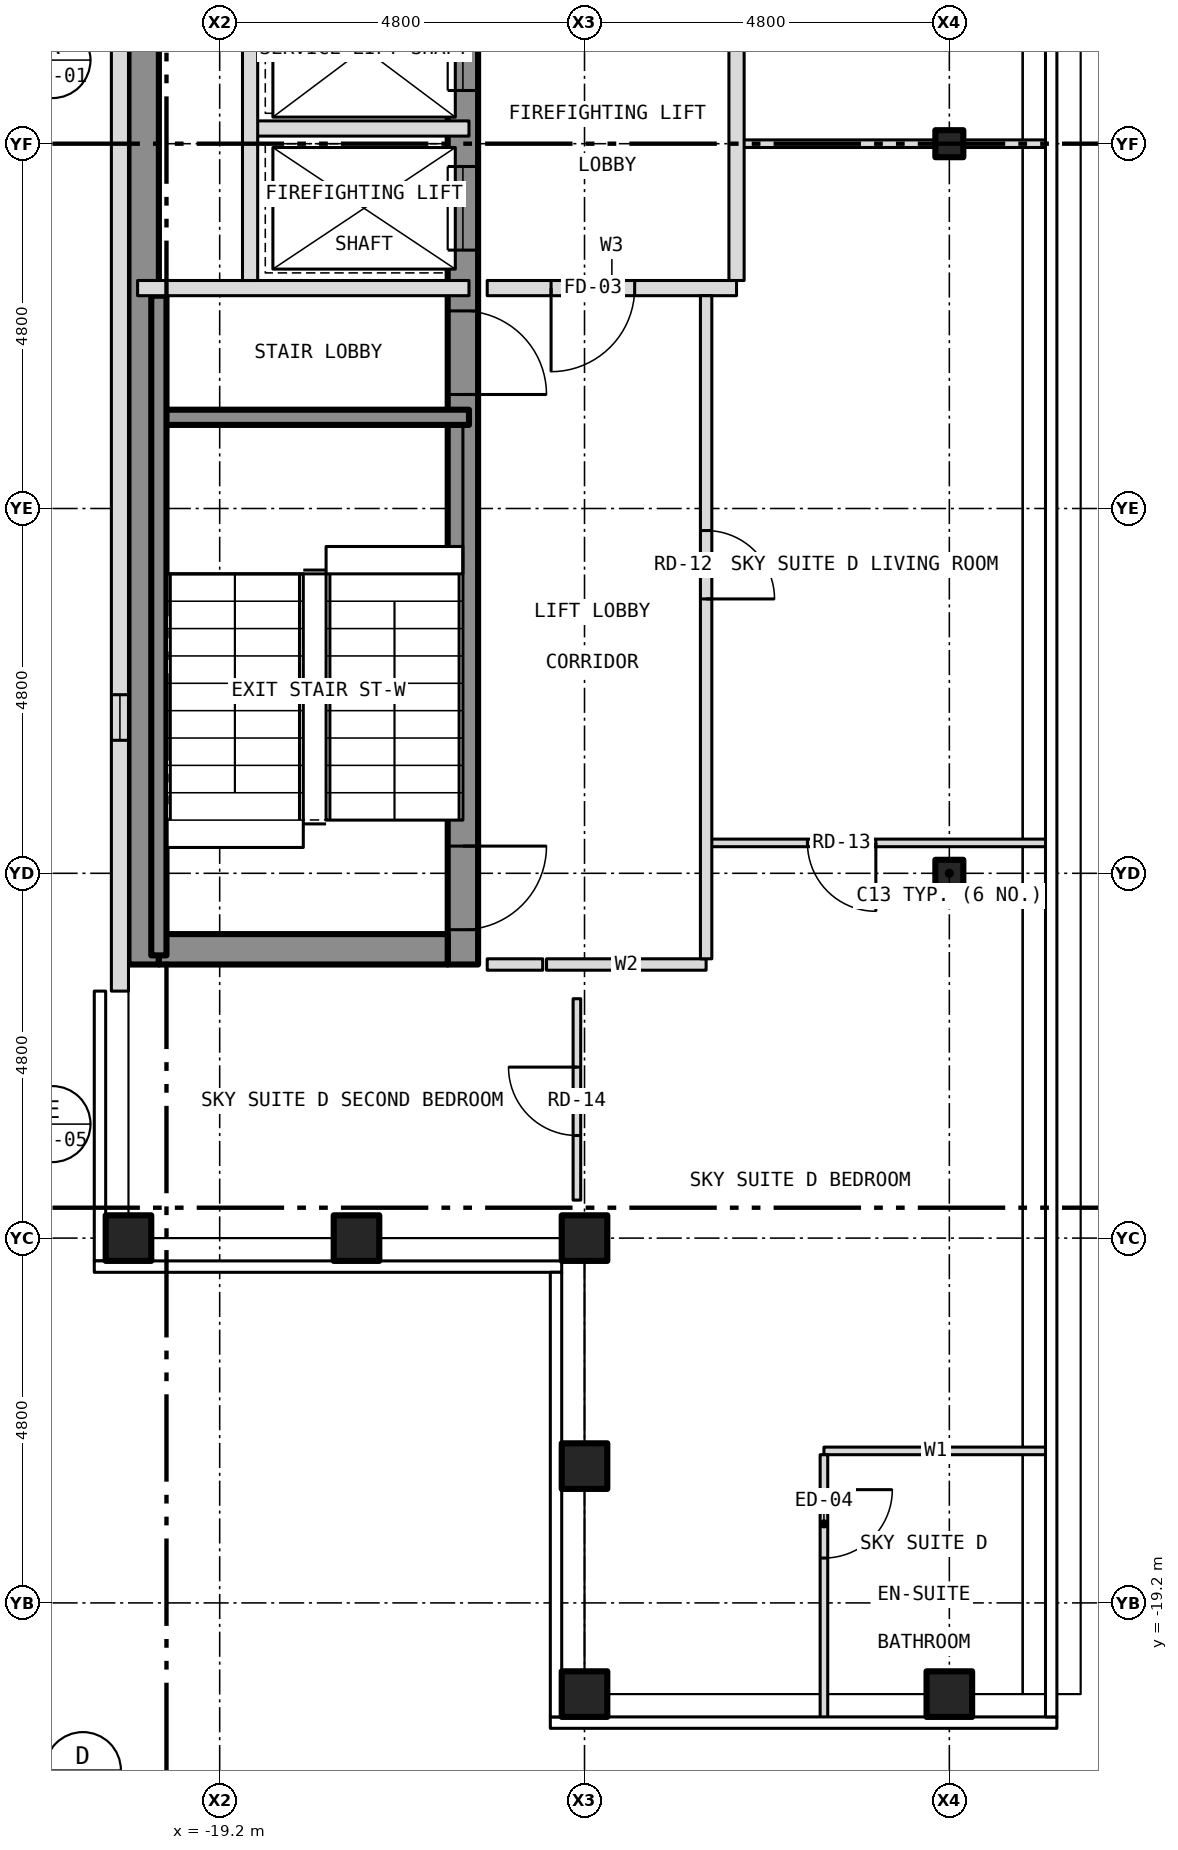
"""IFC4 building model, lengths in metres.
Left out: names, types, materials, properties, quantities, classifications, styles, units other than length and angle.
Written with IfcOpenShell. Run it as: python <this file> out.ifc"""

import sys

from ifc_helpers import new_model, si_unit, direction, frame, frame_2d, origin, origin_2d, place, context, subcontext, project, spatial, rectangle, hollow_rectangle, i_section, extrude, element, fill, save


model = new_model("IFC4")
c1 = context("Model", 3, precision=1e-05, world=origin(), true_north=direction((0.0, 1.0)))
c2 = subcontext(c1, "Body", "Model", "MODEL_VIEW")
j1 = project(units=[si_unit("LENGTHUNIT", "METRE"), si_unit("PLANEANGLEUNIT", "RADIAN")], contexts=[c1])
p1 = place(None, origin())
s1 = spatial("IfcSite", under=j1, at=p1, CompositionType="ELEMENT")
p2 = place(p1, origin())
s2 = spatial("IfcBuilding", under=s1, at=p2, CompositionType="ELEMENT")
p3 = place(p2, frame((0.0, 0.0, 272.5)))
s3 = spatial("IfcBuildingStorey", under=s2, at=p3, CompositionType="ELEMENT", Elevation=272.5)
for number, where, z_axis, x_axis in (
    (1, (-14.4, -20.4, -0.15), (0.0, 0.0, 1.0), (1.0, 0.0, 0.0)),
    (2, (-9.6, -20.4, -0.15), (0.0, 0.0, 1.0), (1.0, 0.0, 0.0)),
    (3, (-20.4, -14.4, -0.15), (0.0, 0.0, 1.0), (1.0, 0.0, 0.0)),
    (4, (-14.4, -14.4, -0.15), (0.0, 0.0, 1.0), (1.0, 0.0, 0.0)),
    (5, (-14.4, -17.4, -0.15), (0.0, 0.0, 1.0), (1.0, 0.0, 0.0)),
    (6, (-17.4, -14.4, -0.15), (0.0, 0.0, 1.0), (1.0, 0.0, 0.0)),
):
    element("IfcColumn", number, at=place(p3, frame(where, z_axis=z_axis, x_axis=x_axis)), inside=s3, PredefinedType="COLUMN", context=c2, shape_type="SweptSolid", body=[
        extrude(hollow_rectangle(XDim=0.6, YDim=0.6, WallThickness=0.03, at=origin_2d()), origin(), (0.0, 0.0, 1.0), 3.5),
    ])
for number, where, z_axis, x_axis in (
    (7, (-9.6, -9.6, -0.15), (0.0, 0.0, 1.0), (1.0, 0.0, 0.0)),
    (8, (-9.6, 0.0, -0.15), (0.0, 0.0, 1.0), (1.0, 0.0, 0.0)),
):
    element("IfcColumn", number, at=place(p3, frame(where, z_axis=z_axis, x_axis=x_axis)), inside=s3, PredefinedType="COLUMN", context=c2, shape_type="SweptSolid", body=[
        extrude(i_section(OverallWidth=0.368, OverallDepth=0.356, WebThickness=0.011, FlangeThickness=0.018, at=origin_2d()), origin(), (0.0, 0.0, 1.0), 3.5),
    ])
p4 = place(p3, frame((-16.0, -10.8, 0.0), z_axis=(0.0, 0.0, 1.0), x_axis=(0.0, 1.0, 0.0)))
e9 = element("IfcWall", 9, at=p4, inside=s3, PredefinedType="SHEAR", context=c2, shape_type="SweptSolid", body=[
    extrude(rectangle(XDim=21.6, YDim=0.4, at=frame_2d((10.8, 0.0))), origin(), (0.0, 0.0, 1.0), 3.25),
])
p5 = place(p4, frame((9.4, 0.0, 0.0)))
e10 = element("IfcOpeningElement", 10, at=p5, cuts=e9, PredefinedType="OPENING", context=c2, shape_type="SweptSolid", body=[
    extrude(rectangle(XDim=1.1, YDim=2.1, at=frame_2d((0.55, 1.05))), frame((0.0, 0.212, 0.0), z_axis=(0.0, -1.0, 0.0), x_axis=(1.0, 0.0, 0.0)), (0.0, 0.0, 1.0), 0.424),
])
p6 = place(p4, frame((11.5, 0.0, 0.0)))
e11 = element("IfcOpeningElement", 11, at=p6, cuts=e9, PredefinedType="OPENING", context=c2, shape_type="SweptSolid", body=[
    extrude(rectangle(XDim=1.1, YDim=2.1, at=frame_2d((0.55, 1.05))), frame((0.0, 0.212, 0.0), z_axis=(0.0, -1.0, 0.0), x_axis=(1.0, 0.0, 0.0)), (0.0, 0.0, 1.0), 0.424),
])
p7 = place(p4, frame((13.6, 0.0, 0.0)))
e12 = element("IfcOpeningElement", 12, at=p7, cuts=e9, PredefinedType="OPENING", context=c2, shape_type="SweptSolid", body=[
    extrude(rectangle(XDim=1.1, YDim=2.1, at=frame_2d((0.55, 1.05))), frame((0.0, 0.212, 0.0), z_axis=(0.0, -1.0, 0.0), x_axis=(1.0, 0.0, 0.0)), (0.0, 0.0, 1.0), 0.424),
])
p8 = place(p4, frame((15.7, 0.0, 0.0)))
e13 = element("IfcOpeningElement", 13, at=p8, cuts=e9, PredefinedType="OPENING", context=c2, shape_type="SweptSolid", body=[
    extrude(rectangle(XDim=1.1, YDim=2.1, at=frame_2d((0.55, 1.05))), frame((0.0, 0.212, 0.0), z_axis=(0.0, -1.0, 0.0), x_axis=(1.0, 0.0, 0.0)), (0.0, 0.0, 1.0), 0.424),
])
p9 = place(p4, frame((17.8, 0.0, 0.0)))
e14 = element("IfcOpeningElement", 14, at=p9, cuts=e9, PredefinedType="OPENING", context=c2, shape_type="SweptSolid", body=[
    extrude(rectangle(XDim=1.1, YDim=2.1, at=frame_2d((0.55, 1.05))), frame((0.0, 0.212, 0.0), z_axis=(0.0, -1.0, 0.0), x_axis=(1.0, 0.0, 0.0)), (0.0, 0.0, 1.0), 0.424),
])
p10 = place(p4, frame((0.458, 0.0, 0.0)))
e15 = element("IfcOpeningElement", 15, at=p10, cuts=e9, PredefinedType="OPENING", context=c2, shape_type="SweptSolid", body=[
    extrude(rectangle(XDim=1.1, YDim=2.1, at=frame_2d((0.55, 1.05))), frame((0.0, 0.212, 0.0), z_axis=(0.0, -1.0, 0.0), x_axis=(1.0, 0.0, 0.0)), (0.0, 0.0, 1.0), 0.424),
])
p11 = place(p4, frame((7.5, 0.0, 0.0)))
e16 = element("IfcOpeningElement", 16, at=p11, cuts=e9, PredefinedType="OPENING", context=c2, shape_type="SweptSolid", body=[
    extrude(rectangle(XDim=1.1, YDim=2.1, at=frame_2d((0.55, 1.05))), frame((0.0, 0.212, 0.0), z_axis=(0.0, -1.0, 0.0), x_axis=(1.0, 0.0, 0.0)), (0.0, 0.0, 1.0), 0.424),
])
p12 = place(p4, frame((20.0, 0.0, 0.0)))
e17 = element("IfcOpeningElement", 17, at=p12, cuts=e9, PredefinedType="OPENING", context=c2, shape_type="SweptSolid", body=[
    extrude(rectangle(XDim=0.9, YDim=2.1, at=frame_2d((0.45, 1.05))), frame((0.0, 0.212, 0.0), z_axis=(0.0, -1.0, 0.0), x_axis=(1.0, 0.0, 0.0)), (0.0, 0.0, 1.0), 0.424),
])
p13 = place(p3, frame((-20.2, -10.8, 0.0), z_axis=(0.0, 0.0, 1.0), x_axis=(0.0, 1.0, 0.0)))
e18 = element("IfcWall", 18, at=p13, inside=s3, PredefinedType="SHEAR", context=c2, shape_type="SweptSolid", body=[
    extrude(rectangle(XDim=21.6, YDim=0.4, at=frame_2d((10.8, 0.0))), origin(), (0.0, 0.0, 1.0), 3.25),
])
p14 = place(p3, frame((-20.0, -10.6, 0.0), z_axis=(0.0, 0.0, 1.0), x_axis=(1.0, 0.0, 0.0)))
e19 = element("IfcWall", 19, at=p14, inside=s3, PredefinedType="SHEAR", context=c2, shape_type="SweptSolid", body=[
    extrude(rectangle(XDim=3.8, YDim=0.4, at=frame_2d((1.9, 0.0))), origin(), (0.0, 0.0, 1.0), 3.25),
])
p15 = place(p3, frame((-20.512, 11.15, 0.0), z_axis=(0.0, 0.0, 1.0), x_axis=(0.0, -1.0, 0.0)))
e20 = element("IfcWall", 20, at=p15, inside=s3, PredefinedType="SOLIDWALL", context=c2, shape_type="SweptSolid", body=[
    extrude(rectangle(XDim=22.3, YDim=0.225, at=frame_2d((11.15, 0.0))), origin(), (0.0, 0.0, 1.0), 3.5),
])
p16 = place(p15, frame((18.4, 0.0, 1.0)))
e21 = element("IfcOpeningElement", 21, at=p16, cuts=e20, PredefinedType="OPENING", context=c2, shape_type="SweptSolid", body=[
    extrude(rectangle(XDim=0.6, YDim=1.5, at=frame_2d((0.3, 0.75))), frame((0.0, 0.125, 0.0), z_axis=(0.0, -1.0, 0.0), x_axis=(1.0, 0.0, 0.0)), (0.0, 0.0, 1.0), 0.249),
])
p17 = place(p3, frame((-11.25, -17.2, 0.0), z_axis=(0.0, 0.0, 1.0), x_axis=(1.0, 0.0, 0.0)))
e22 = element("IfcWall", 22, at=p17, inside=s3, PredefinedType="PARTITIONING", context=c2, shape_type="SweptSolid", body=[
    extrude(rectangle(XDim=2.945, YDim=0.1, at=frame_2d((1.473, 0.0))), origin(), (0.0, 0.0, 1.0), 3.35),
])
p18 = place(p3, frame((-15.68, -10.8, 0.0), z_axis=(0.0, 0.0, 1.0), x_axis=(1.0, 0.0, 0.0)))
e23 = element("IfcWall", 23, at=p18, inside=s3, PredefinedType="PARTITIONING", context=c2, shape_type="SweptSolid", body=[
    extrude(rectangle(XDim=0.73, YDim=0.15, at=frame_2d((0.365, 0.0))), origin(), (0.0, 0.0, 1.0), 3.35),
])
p19 = place(p3, frame((-14.9, -10.8, 0.0), z_axis=(0.0, 0.0, 1.0), x_axis=(1.0, 0.0, 0.0)))
e24 = element("IfcWall", 24, at=p19, inside=s3, PredefinedType="PARTITIONING", context=c2, shape_type="SweptSolid", body=[
    extrude(rectangle(XDim=2.1, YDim=0.15, at=frame_2d((1.05, 0.0))), origin(), (0.0, 0.0, 1.0), 3.35),
])
p20 = place(p3, frame((-12.8, -9.2, 0.0), z_axis=(0.0, 0.0, 1.0), x_axis=(1.0, 0.0, 0.0)))
e25 = element("IfcWall", 25, at=p20, inside=s3, PredefinedType="PARTITIONING", context=c2, shape_type="SweptSolid", body=[
    extrude(rectangle(XDim=4.495, YDim=0.1, at=frame_2d((2.248, 0.0))), origin(), (0.0, 0.0, 1.0), 3.35),
])
p21 = place(p20, frame((1.333, 0.0, 0.0)))
e26 = element("IfcOpeningElement", 26, at=p21, cuts=e25, PredefinedType="OPENING", context=c2, shape_type="SweptSolid", body=[
    extrude(rectangle(XDim=0.9, YDim=2.1, at=frame_2d((0.45, 1.05))), frame((0.0, 0.062, 0.0), z_axis=(0.0, -1.0, 0.0), x_axis=(1.0, 0.0, 0.0)), (0.0, 0.0, 1.0), 0.124),
])
p22 = place(p3, frame((-20.0, -3.6, 0.0), z_axis=(0.0, 0.0, 1.0), x_axis=(1.0, 0.0, 0.0)))
e27 = element("IfcWall", 27, at=p22, inside=s3, PredefinedType="SHEAR", context=c2, shape_type="SweptSolid", body=[
    extrude(rectangle(XDim=4.08, YDim=0.2, at=frame_2d((2.04, 0.0))), origin(), (0.0, 0.0, 1.0), 3.25),
])
p23 = place(p3, frame((-20.28, -1.9, 0.0), z_axis=(0.0, 0.0, 1.0), x_axis=(1.0, 0.0, 0.0)))
e28 = element("IfcWall", 28, at=p23, inside=s3, PredefinedType="PARTITIONING", context=c2, shape_type="SweptSolid", body=[
    extrude(rectangle(XDim=4.36, YDim=0.2, at=frame_2d((2.18, 0.0))), origin(), (0.0, 0.0, 1.0), 3.25),
])
p24 = place(p3, frame((-15.68, -1.9, 0.0), z_axis=(0.0, 0.0, 1.0), x_axis=(1.0, 0.0, 0.0)))
e29 = element("IfcWall", 29, at=p24, inside=s3, PredefinedType="PARTITIONING", context=c2, shape_type="SweptSolid", body=[
    extrude(rectangle(XDim=3.28, YDim=0.2, at=frame_2d((1.64, 0.0))), origin(), (0.0, 0.0, 1.0), 3.35),
])
p25 = place(p24, frame((0.84, 0.0, 0.0)))
e30 = element("IfcOpeningElement", 30, at=p25, cuts=e29, PredefinedType="OPENING", context=c2, shape_type="SweptSolid", body=[
    extrude(rectangle(XDim=1.1, YDim=2.1, at=frame_2d((0.55, 1.05))), frame((0.0, 0.112, 0.0), z_axis=(0.0, -1.0, 0.0), x_axis=(1.0, 0.0, 0.0)), (0.0, 0.0, 1.0), 0.224),
])
p26 = place(p3, frame((-12.4, 0.0, 0.0), z_axis=(0.0, 0.0, 1.0), x_axis=(1.0, 0.0, 0.0)))
e31 = element("IfcWall", 31, at=p26, inside=s3, PredefinedType="PARTITIONING", context=c2, shape_type="SweptSolid", body=[
    extrude(rectangle(XDim=2.616, YDim=0.1, at=frame_2d((1.308, 0.0))), origin(), (0.0, 0.0, 1.0), 2.728),
])
p27 = place(p3, frame((-9.784, 0.0, 0.0), z_axis=(0.0, 0.0, 1.0), x_axis=(1.0, 0.0, 0.0)))
e32 = element("IfcWall", 32, at=p27, inside=s3, PredefinedType="PARTITIONING", context=c2, shape_type="SweptSolid", body=[
    extrude(rectangle(XDim=1.479, YDim=0.1, at=frame_2d((0.74, 0.0))), origin(), (0.0, 0.0, 1.0), 3.35),
])
p28 = place(p3, frame((-18.8, 0.2, 0.0), z_axis=(0.0, 0.0, 1.0), x_axis=(1.0, 0.0, 0.0)))
e33 = element("IfcWall", 33, at=p28, inside=s3, PredefinedType="PARTITIONING", context=c2, shape_type="SweptSolid", body=[
    extrude(rectangle(XDim=2.88, YDim=0.2, at=frame_2d((1.44, 0.0))), origin(), (0.0, 0.0, 1.0), 3.25),
])
p29 = place(p3, frame((-20.0, -10.68, 0.0), z_axis=(0.0, 0.0, 1.0), x_axis=(0.0, 1.0, 0.0)))
e34 = element("IfcWall", 34, at=p29, inside=s3, PredefinedType="SHEAR", context=c2, shape_type="SweptSolid", body=[
    extrude(rectangle(XDim=8.68, YDim=0.2, at=frame_2d((4.34, 0.0))), origin(), (0.0, 0.0, 1.0), 3.25),
])
p30 = place(p3, frame((-18.8, -1.8, 0.0), z_axis=(0.0, 0.0, 1.0), x_axis=(0.0, 1.0, 0.0)))
e35 = element("IfcWall", 35, at=p30, inside=s3, PredefinedType="PARTITIONING", context=c2, shape_type="SweptSolid", body=[
    extrude(rectangle(XDim=8.2, YDim=0.2, at=frame_2d((4.1, 0.0))), origin(), (0.0, 0.0, 1.0), 3.25),
])
p31 = place(p3, frame((-14.5, -13.9, 0.0), z_axis=(0.0, 0.0, 1.0), x_axis=(0.0, 1.0, 0.0)))
e36 = element("IfcWall", 36, at=p31, inside=s3, PredefinedType="PARTITIONING", context=c2, shape_type="SweptSolid", body=[
    extrude(rectangle(XDim=2.65, YDim=0.1, at=frame_2d((1.325, 0.0))), origin(), (0.0, 0.0, 1.0), 2.817),
])
p32 = place(p31, frame((0.85, 0.0, 0.0)))
e37 = element("IfcOpeningElement", 37, at=p32, cuts=e36, PredefinedType="OPENING", context=c2, shape_type="SweptSolid", body=[
    extrude(rectangle(XDim=0.9, YDim=2.1, at=frame_2d((0.45, 1.05))), frame((0.0, 0.062, 0.0), z_axis=(0.0, -1.0, 0.0), x_axis=(1.0, 0.0, 0.0)), (0.0, 0.0, 1.0), 0.124),
])
p33 = place(p3, frame((-12.8, -10.725, 0.0), z_axis=(0.0, 0.0, 1.0), x_axis=(0.0, 1.0, 0.0)))
e38 = element("IfcWall", 38, at=p33, inside=s3, PredefinedType="PARTITIONING", context=c2, shape_type="SweptSolid", body=[
    extrude(rectangle(XDim=8.725, YDim=0.15, at=frame_2d((4.363, 0.0))), origin(), (0.0, 0.0, 1.0), 3.35),
])
p34 = place(p33, frame((4.735, 0.0, 0.0)))
e39 = element("IfcOpeningElement", 39, at=p34, cuts=e38, PredefinedType="OPENING", context=c2, shape_type="SweptSolid", body=[
    extrude(rectangle(XDim=0.9, YDim=2.1, at=frame_2d((0.45, 1.05))), frame((0.0, 0.087, 0.0), z_axis=(0.0, -1.0, 0.0), x_axis=(1.0, 0.0, 0.0)), (0.0, 0.0, 1.0), 0.174),
])
p35 = place(p3, frame((-12.4, -1.8, 0.0), z_axis=(0.0, 0.0, 1.0), x_axis=(0.0, 1.0, 0.0)))
e40 = element("IfcWall", 40, at=p35, inside=s3, PredefinedType="PARTITIONING", context=c2, shape_type="SweptSolid", body=[
    extrude(rectangle(XDim=4.0, YDim=0.2, at=frame_2d((2.0, 0.0))), origin(), (0.0, 0.0, 1.0), 3.35),
])
p36 = place(p3, frame((-11.25, -20.73, 0.0), z_axis=(0.0, 0.0, 1.0), x_axis=(0.0, 1.0, 0.0)))
e41 = element("IfcWall", 41, at=p36, inside=s3, PredefinedType="PARTITIONING", context=c2, shape_type="SweptSolid", body=[
    extrude(rectangle(XDim=3.48, YDim=0.1, at=frame_2d((1.74, 0.0))), origin(), (0.0, 0.0, 1.0), 3.35),
])
p37 = place(p36, frame((2.12, 0.0, 0.0)))
e42 = element("IfcOpeningElement", 42, at=p37, cuts=e41, PredefinedType="OPENING", context=c2, shape_type="SweptSolid", body=[
    extrude(rectangle(XDim=0.9, YDim=2.1, at=frame_2d((0.45, 1.05))), frame((0.0, 0.062, 0.0), z_axis=(0.0, -1.0, 0.0), x_axis=(1.0, 0.0, 0.0)), (0.0, 0.0, 1.0), 0.124),
])
p38 = place(p16, origin())
e43 = element("IfcWindow", 43, at=p38, inside=s3, PartitioningType="SINGLE_PANEL", PredefinedType="WINDOW", context=c2, shape_type="SweptSolid", body=[
    extrude(rectangle(XDim=0.6, YDim=1.5, at=frame_2d((0.3, 0.75))), frame((0.0, -0.022, 0.0), z_axis=(0.0, -1.0, 0.0), x_axis=(1.0, 0.0, 0.0)), (0.0, 0.0, 1.0), 0.06),
])
fill(e21, e43)
p39 = place(p5, origin())
e44 = element("IfcDoor", 44, at=p39, inside=s3, OperationType="SLIDING_TO_LEFT", PredefinedType="DOOR", context=c2, shape_type="SweptSolid", body=[
    extrude(rectangle(XDim=1.1, YDim=2.1, at=frame_2d((0.55, 1.05))), frame((0.0, 0.025, 0.0), z_axis=(0.0, -1.0, 0.0), x_axis=(1.0, 0.0, 0.0)), (0.0, 0.0, 1.0), 0.05),
])
fill(e10, e44)
p40 = place(p6, origin())
e45 = element("IfcDoor", 45, at=p40, inside=s3, OperationType="SLIDING_TO_LEFT", PredefinedType="DOOR", context=c2, shape_type="SweptSolid", body=[
    extrude(rectangle(XDim=1.1, YDim=2.1, at=frame_2d((0.55, 1.05))), frame((0.0, 0.025, 0.0), z_axis=(0.0, -1.0, 0.0), x_axis=(1.0, 0.0, 0.0)), (0.0, 0.0, 1.0), 0.05),
])
fill(e11, e45)
p41 = place(p10, origin())
e46 = element("IfcDoor", 46, at=p41, inside=s3, OperationType="SINGLE_SWING_RIGHT", PredefinedType="DOOR", context=c2, shape_type="SweptSolid", body=[
    extrude(rectangle(XDim=1.1, YDim=2.1, at=frame_2d((0.55, 1.05))), frame((0.0, 0.025, 0.0), z_axis=(0.0, -1.0, 0.0), x_axis=(1.0, 0.0, 0.0)), (0.0, 0.0, 1.0), 0.05),
])
fill(e15, e46)
p42 = place(p11, origin())
e47 = element("IfcDoor", 47, at=p42, inside=s3, OperationType="SINGLE_SWING_LEFT", PredefinedType="DOOR", context=c2, shape_type="SweptSolid", body=[
    extrude(rectangle(XDim=1.1, YDim=2.1, at=frame_2d((0.55, 1.05))), frame((0.0, 0.025, 0.0), z_axis=(0.0, -1.0, 0.0), x_axis=(1.0, 0.0, 0.0)), (0.0, 0.0, 1.0), 0.05),
])
fill(e16, e47)
p43 = place(p25, origin())
e48 = element("IfcDoor", 48, at=p43, inside=s3, OperationType="SINGLE_SWING_LEFT", PredefinedType="DOOR", context=c2, shape_type="SweptSolid", body=[
    extrude(rectangle(XDim=1.1, YDim=2.1, at=frame_2d((0.55, 1.05))), frame((0.0, 0.025, 0.0), z_axis=(0.0, -1.0, 0.0), x_axis=(1.0, 0.0, 0.0)), (0.0, 0.0, 1.0), 0.05),
])
fill(e30, e48)
p44 = place(p34, origin())
e49 = element("IfcDoor", 49, at=p44, inside=s3, OperationType="SINGLE_SWING_LEFT", PredefinedType="DOOR", context=c2, shape_type="SweptSolid", body=[
    extrude(rectangle(XDim=0.9, YDim=2.1, at=frame_2d((0.45, 1.05))), frame((0.0, 0.025, 0.0), z_axis=(0.0, -1.0, 0.0), x_axis=(1.0, 0.0, 0.0)), (0.0, 0.0, 1.0), 0.05),
])
fill(e39, e49)
p45 = place(p21, origin())
e50 = element("IfcDoor", 50, at=p45, inside=s3, OperationType="SINGLE_SWING_RIGHT", PredefinedType="DOOR", context=c2, shape_type="SweptSolid", body=[
    extrude(rectangle(XDim=0.9, YDim=2.1, at=frame_2d((0.45, 1.05))), frame((0.0, 0.025, 0.0), z_axis=(0.0, -1.0, 0.0), x_axis=(1.0, 0.0, 0.0)), (0.0, 0.0, 1.0), 0.05),
])
fill(e26, e50)
p46 = place(p37, origin())
e51 = element("IfcDoor", 51, at=p46, inside=s3, OperationType="SINGLE_SWING_RIGHT", PredefinedType="DOOR", context=c2, shape_type="SweptSolid", body=[
    extrude(rectangle(XDim=0.9, YDim=2.1, at=frame_2d((0.45, 1.05))), frame((0.0, 0.025, 0.0), z_axis=(0.0, -1.0, 0.0), x_axis=(1.0, 0.0, 0.0)), (0.0, 0.0, 1.0), 0.05),
])
fill(e42, e51)
p47 = place(p32, origin())
e52 = element("IfcDoor", 52, at=p47, inside=s3, OperationType="SINGLE_SWING_RIGHT", PredefinedType="DOOR", context=c2, shape_type="SweptSolid", body=[
    extrude(rectangle(XDim=0.9, YDim=2.1, at=frame_2d((0.45, 1.05))), frame((0.0, 0.025, 0.0), z_axis=(0.0, -1.0, 0.0), x_axis=(1.0, 0.0, 0.0)), (0.0, 0.0, 1.0), 0.05),
])
fill(e37, e52)
save(model, sys.argv[1])
